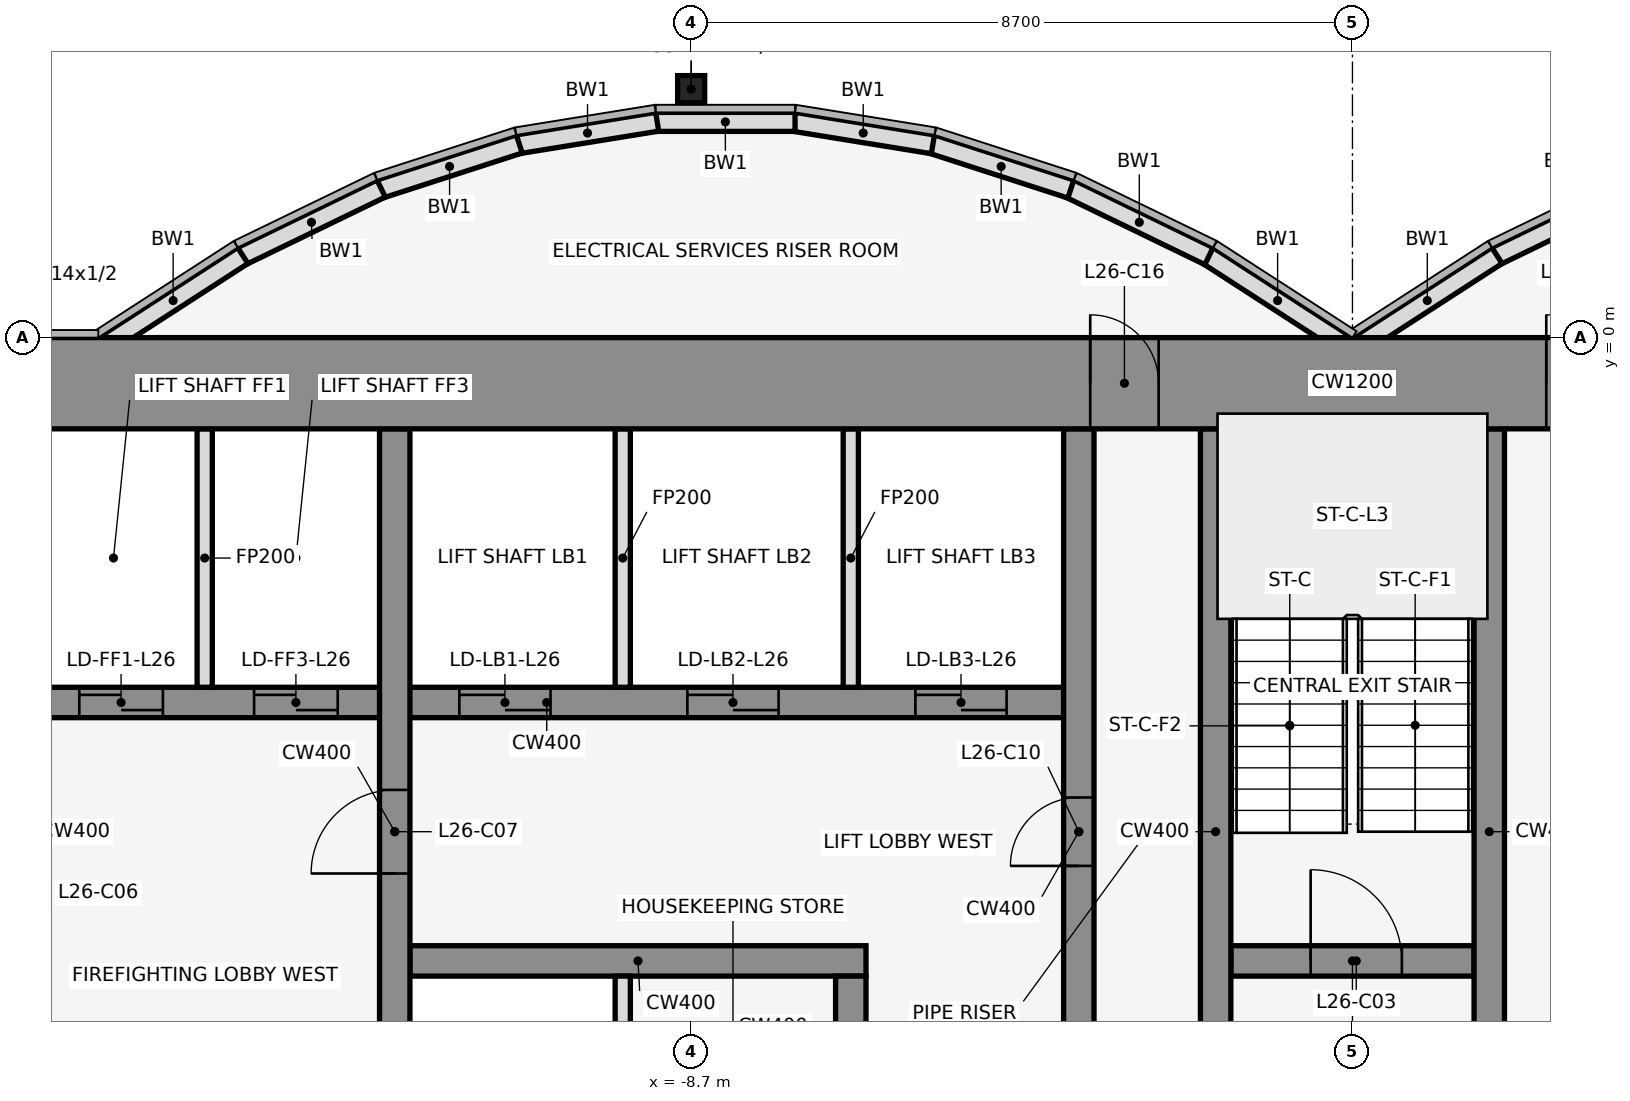
"""IFC4 building model, lengths in metres.
Left out: names, types, materials, properties, quantities, classifications, styles, units other than length and angle.
Written with IfcOpenShell. Run it as: python <this file> out.ifc"""

import sys

from ifc_helpers import new_model, si_unit, direction, frame, frame_2d, origin, origin_2d, place, context, subcontext, project, spatial, rectangle, hollow_rectangle, extrude, element, fill, save


model = new_model("IFC4")
c1 = context("Model", 3, precision=1e-05, world=origin(), true_north=direction((0.0, 1.0)))
c2 = subcontext(c1, "Body", "Model", "MODEL_VIEW")
j1 = project(units=[si_unit("LENGTHUNIT", "METRE"), si_unit("PLANEANGLEUNIT", "RADIAN")], contexts=[c1])
p1 = place(None, origin())
s1 = spatial("IfcSite", under=j1, at=p1, CompositionType="ELEMENT")
p2 = place(p1, origin())
s2 = spatial("IfcBuilding", under=s1, at=p2, CompositionType="ELEMENT")
p3 = place(p2, frame((0.0, 0.0, 122.7)))
s3 = spatial("IfcBuildingStorey", under=s2, at=p3, CompositionType="ELEMENT", Elevation=122.7)
p4 = place(p3, frame((-8.7, 3.269, 0.0), z_axis=(0.0, 0.0, 1.0), x_axis=(1.0, 0.0, 0.0)))
e1 = element("IfcColumn", 1, at=p4, inside=s3, PredefinedType="COLUMN", context=c2, shape_type="SweptSolid", body=[
    extrude(hollow_rectangle(XDim=0.356, YDim=0.356, WallThickness=0.012, at=origin_2d()), origin(), (0.0, 0.0, 1.0), 4.1),
])
p5 = place(p3, frame((3.721, 1.962, 0.0), z_axis=(0.0, 0.0, 1.0), x_axis=(-0.89982408427, -0.436252928206, 0.0)))
e2 = element("IfcWall", 2, at=p5, inside=s3, PredefinedType="STANDARD", context=c2, shape_type="SweptSolid", body=[
    extrude(rectangle(XDim=2.038, YDim=0.25, at=frame_2d((1.019, 0.0))), origin(), (0.0, 0.0, 1.0), 3.95),
])
for number, where, z_axis, x_axis in (
    (3, (1.901, 1.08, 0.0), (0.0, 0.0, 1.0), (-0.84, -0.543, 0.0)),
    (4, (-0.068, -0.105, 0.0), (0.0, 0.0, 1.0), (-0.84, 0.543, 0.0)),
):
    element("IfcWall", number, at=place(p3, frame(where, z_axis=z_axis, x_axis=x_axis)), inside=s3, PredefinedType="STANDARD", context=c2, shape_type="SweptSolid", body=[
        extrude(rectangle(XDim=2.183, YDim=0.25, at=frame_2d((1.091, 0.0))), origin(), (0.0, 0.0, 1.0), 3.95),
    ])
p6 = place(p3, frame((-1.888, 1.073, 0.0), z_axis=(0.0, 0.0, 1.0), x_axis=(-0.89982408427, 0.436252928206, 0.0)))
e5 = element("IfcWall", 5, at=p6, inside=s3, PredefinedType="STANDARD", context=c2, shape_type="SweptSolid", body=[
    extrude(rectangle(XDim=2.038, YDim=0.25, at=frame_2d((1.019, 0.0))), origin(), (0.0, 0.0, 1.0), 3.95),
])
p7 = place(p3, frame((-3.705, 1.955, 0.0), z_axis=(0.0, 0.0, 1.0), x_axis=(-0.951495806175, 0.307661714928, 0.0)))
e6 = element("IfcWall", 6, at=p7, inside=s3, PredefinedType="STANDARD", context=c2, shape_type="SweptSolid", body=[
    extrude(rectangle(XDim=1.927, YDim=0.25, at=frame_2d((0.963, 0.0))), origin(), (0.0, 0.0, 1.0), 3.95),
])
p8 = place(p3, frame((-5.52, 2.543, 0.0), z_axis=(0.0, 0.0, 1.0), x_axis=(-0.987181718931, 0.159600293885, 0.0)))
e7 = element("IfcWall", 7, at=p8, inside=s3, PredefinedType="STANDARD", context=c2, shape_type="SweptSolid", body=[
    extrude(rectangle(XDim=1.857, YDim=0.25, at=frame_2d((0.929, 0.0))), origin(), (0.0, 0.0, 1.0), 3.95),
])
p9 = place(p3, frame((-7.333, 2.838, 0.0), z_axis=(0.0, 0.0, 1.0), x_axis=(-1.0, 0.0, 0.0)))
e8 = element("IfcWall", 8, at=p9, inside=s3, PredefinedType="STANDARD", context=c2, shape_type="SweptSolid", body=[
    extrude(rectangle(XDim=1.833, YDim=0.25, at=frame_2d((0.917, 0.0))), origin(), (0.0, 0.0, 1.0), 3.95),
])
p10 = place(p3, frame((-9.147, 2.84, 0.0), z_axis=(0.0, 0.0, 1.0), x_axis=(-0.987181718931, -0.159600293885, 0.0)))
e9 = element("IfcWall", 9, at=p10, inside=s3, PredefinedType="STANDARD", context=c2, shape_type="SweptSolid", body=[
    extrude(rectangle(XDim=1.857, YDim=0.25, at=frame_2d((0.929, 0.0))), origin(), (0.0, 0.0, 1.0), 3.95),
])
p11 = place(p3, frame((-10.962, 2.548, 0.0), z_axis=(0.0, 0.0, 1.0), x_axis=(-0.951495806175, -0.307661714928, 0.0)))
e10 = element("IfcWall", 10, at=p11, inside=s3, PredefinedType="STANDARD", context=c2, shape_type="SweptSolid", body=[
    extrude(rectangle(XDim=1.927, YDim=0.25, at=frame_2d((0.963, 0.0))), origin(), (0.0, 0.0, 1.0), 3.95),
])
p12 = place(p3, frame((-12.779, 1.962, 0.0), z_axis=(0.0, 0.0, 1.0), x_axis=(-0.89982408427, -0.436252928206, 0.0)))
e11 = element("IfcWall", 11, at=p12, inside=s3, PredefinedType="STANDARD", context=c2, shape_type="SweptSolid", body=[
    extrude(rectangle(XDim=2.038, YDim=0.25, at=frame_2d((1.019, 0.0))), origin(), (0.0, 0.0, 1.0), 3.95),
])
p13 = place(p3, frame((-14.599, 1.08, 0.0), z_axis=(0.0, 0.0, 1.0), x_axis=(-0.83981312244, -0.542875602121, 0.0)))
e12 = element("IfcWall", 12, at=p13, inside=s3, PredefinedType="STANDARD", context=c2, shape_type="SweptSolid", body=[
    extrude(rectangle(XDim=2.183, YDim=0.25, at=frame_2d((1.091, 0.0))), origin(), (0.0, 0.0, 1.0), 3.95),
])
p14 = place(p3, frame((-12.4, -8.2, 0.0), z_axis=(0.0, 0.0, 1.0), x_axis=(1.0, 0.0, 0.0)))
e13 = element("IfcWall", 13, at=p14, inside=s3, PredefinedType="SHEAR", context=c2, shape_type="SweptSolid", body=[
    extrude(rectangle(XDim=6.0, YDim=0.4, at=frame_2d((3.0, 0.0))), origin(), (0.0, 0.0, 1.0), 4.1),
])
p15 = place(p3, frame((-1.6, -8.2, 0.0), z_axis=(0.0, 0.0, 1.0), x_axis=(1.0, 0.0, 0.0)))
e14 = element("IfcWall", 14, at=p15, inside=s3, PredefinedType="SHEAR", context=c2, shape_type="SweptSolid", body=[
    extrude(rectangle(XDim=3.2, YDim=0.4, at=frame_2d((1.6, 0.0))), origin(), (0.0, 0.0, 1.0), 4.1),
])
p16 = place(p15, frame((1.05, 0.0, 0.0)))
e15 = element("IfcOpeningElement", 15, at=p16, cuts=e14, PredefinedType="OPENING", context=c2, shape_type="SweptSolid", body=[
    extrude(rectangle(XDim=1.2, YDim=2.1, at=frame_2d((0.6, 1.05))), frame((0.0, 0.212, 0.0), z_axis=(0.0, -1.0, 0.0), x_axis=(1.0, 0.0, 0.0)), (0.0, 0.0, 1.0), 0.424),
])
p17 = place(p3, frame((-17.4, -4.8, 0.0), z_axis=(0.0, 0.0, 1.0), x_axis=(1.0, 0.0, 0.0)))
e16 = element("IfcWall", 16, at=p17, inside=s3, PredefinedType="SHEAR", context=c2, shape_type="SweptSolid", body=[
    extrude(rectangle(XDim=13.6, YDim=0.4, at=frame_2d((6.8, 0.0))), origin(), (0.0, 0.0, 1.0), 4.1),
])
p18 = place(p17, frame((0.65, 0.0, 0.0)))
e17 = element("IfcOpeningElement", 17, at=p18, cuts=e16, PredefinedType="OPENING", context=c2, shape_type="SweptSolid", body=[
    extrude(rectangle(XDim=1.1, YDim=2.1, at=frame_2d((0.55, 1.05))), frame((0.0, 0.212, 0.0), z_axis=(0.0, -1.0, 0.0), x_axis=(1.0, 0.0, 0.0)), (0.0, 0.0, 1.0), 0.424),
])
p19 = place(p17, frame((2.95, 0.0, 0.0)))
e18 = element("IfcOpeningElement", 18, at=p19, cuts=e16, PredefinedType="OPENING", context=c2, shape_type="SweptSolid", body=[
    extrude(rectangle(XDim=1.1, YDim=2.1, at=frame_2d((0.55, 1.05))), frame((0.0, 0.212, 0.0), z_axis=(0.0, -1.0, 0.0), x_axis=(1.0, 0.0, 0.0)), (0.0, 0.0, 1.0), 0.424),
])
p20 = place(p17, frame((5.65, 0.0, 0.0)))
e19 = element("IfcOpeningElement", 19, at=p20, cuts=e16, PredefinedType="OPENING", context=c2, shape_type="SweptSolid", body=[
    extrude(rectangle(XDim=1.2, YDim=2.1, at=frame_2d((0.6, 1.05))), frame((0.0, 0.212, 0.0), z_axis=(0.0, -1.0, 0.0), x_axis=(1.0, 0.0, 0.0)), (0.0, 0.0, 1.0), 0.424),
])
p21 = place(p17, frame((8.65, 0.0, 0.0)))
e20 = element("IfcOpeningElement", 20, at=p21, cuts=e16, PredefinedType="OPENING", context=c2, shape_type="SweptSolid", body=[
    extrude(rectangle(XDim=1.2, YDim=2.1, at=frame_2d((0.6, 1.05))), frame((0.0, 0.212, 0.0), z_axis=(0.0, -1.0, 0.0), x_axis=(1.0, 0.0, 0.0)), (0.0, 0.0, 1.0), 0.424),
])
p22 = place(p17, frame((11.65, 0.0, 0.0)))
e21 = element("IfcOpeningElement", 21, at=p22, cuts=e16, PredefinedType="OPENING", context=c2, shape_type="SweptSolid", body=[
    extrude(rectangle(XDim=1.2, YDim=2.1, at=frame_2d((0.6, 1.05))), frame((0.0, 0.212, 0.0), z_axis=(0.0, -1.0, 0.0), x_axis=(1.0, 0.0, 0.0)), (0.0, 0.0, 1.0), 0.424),
])
p23 = place(p3, frame((-15.1, -4.6, 0.0), z_axis=(0.0, 0.0, 1.0), x_axis=(0.0, 1.0, 0.0)))
e22 = element("IfcWall", 22, at=p23, inside=s3, PredefinedType="PARTITIONING", context=c2, shape_type="SweptSolid", body=[
    extrude(rectangle(XDim=3.4, YDim=0.2, at=frame_2d((1.7, 0.0))), origin(), (0.0, 0.0, 1.0), 3.018),
])
p24 = place(p3, frame((-12.6, -11.8, 0.0), z_axis=(0.0, 0.0, 1.0), x_axis=(0.0, 1.0, 0.0)))
e23 = element("IfcWall", 23, at=p24, inside=s3, PredefinedType="SHEAR", context=c2, shape_type="SweptSolid", body=[
    extrude(rectangle(XDim=10.6, YDim=0.4, at=frame_2d((5.3, 0.0))), origin(), (0.0, 0.0, 1.0), 4.1),
])
p25 = place(p24, frame((4.75, 0.0, 0.0)))
e24 = element("IfcOpeningElement", 24, at=p25, cuts=e23, PredefinedType="OPENING", context=c2, shape_type="SweptSolid", body=[
    extrude(rectangle(XDim=1.1, YDim=2.1, at=frame_2d((0.55, 1.05))), frame((0.0, 0.212, 0.0), z_axis=(0.0, -1.0, 0.0), x_axis=(1.0, 0.0, 0.0)), (0.0, 0.0, 1.0), 0.424),
])
for number, where, z_axis, x_axis in (
    (25, (-9.6, -11.8, 0.0), (0.0, 0.0, 1.0), (0.0, 1.0, 0.0)),
    (26, (-9.6, -4.6, 0.0), (0.0, 0.0, 1.0), (0.0, 1.0, 0.0)),
):
    element("IfcWall", number, at=place(p3, frame(where, z_axis=z_axis, x_axis=x_axis)), inside=s3, PredefinedType="PARTITIONING", context=c2, shape_type="SweptSolid", body=[
        extrude(rectangle(XDim=3.4, YDim=0.2, at=frame_2d((1.7, 0.0))), origin(), (0.0, 0.0, 1.0), 3.018),
    ])
p26 = place(p3, frame((-6.6, -11.8, 0.0), z_axis=(0.0, 0.0, 1.0), x_axis=(0.0, 1.0, 0.0)))
e27 = element("IfcWall", 27, at=p26, inside=s3, PredefinedType="SHEAR", context=c2, shape_type="SweptSolid", body=[
    extrude(rectangle(XDim=3.4, YDim=0.4, at=frame_2d((1.7, 0.0))), origin(), (0.0, 0.0, 1.0), 4.1),
])
p27 = place(p26, frame((1.25, 0.0, 0.0)))
e28 = element("IfcOpeningElement", 28, at=p27, cuts=e27, PredefinedType="OPENING", context=c2, shape_type="SweptSolid", body=[
    extrude(rectangle(XDim=0.9, YDim=2.1, at=frame_2d((0.45, 1.05))), frame((0.0, 0.212, 0.0), z_axis=(0.0, -1.0, 0.0), x_axis=(1.0, 0.0, 0.0)), (0.0, 0.0, 1.0), 0.424),
])
p28 = place(p3, frame((-6.6, -4.6, 0.0), z_axis=(0.0, 0.0, 1.0), x_axis=(0.0, 1.0, 0.0)))
e29 = element("IfcWall", 29, at=p28, inside=s3, PredefinedType="PARTITIONING", context=c2, shape_type="SweptSolid", body=[
    extrude(rectangle(XDim=3.4, YDim=0.2, at=frame_2d((1.7, 0.0))), origin(), (0.0, 0.0, 1.0), 3.018),
])
p29 = place(p3, frame((-3.6, -11.8, 0.0), z_axis=(0.0, 0.0, 1.0), x_axis=(0.0, 1.0, 0.0)))
e30 = element("IfcWall", 30, at=p29, inside=s3, PredefinedType="SHEAR", context=c2, shape_type="SweptSolid", body=[
    extrude(rectangle(XDim=10.6, YDim=0.4, at=frame_2d((5.3, 0.0))), origin(), (0.0, 0.0, 1.0), 4.1),
])
p30 = place(p29, frame((4.85, 0.0, 0.0)))
e31 = element("IfcOpeningElement", 31, at=p30, cuts=e30, PredefinedType="OPENING", context=c2, shape_type="SweptSolid", body=[
    extrude(rectangle(XDim=0.9, YDim=2.1, at=frame_2d((0.45, 1.05))), frame((0.0, 0.212, 0.0), z_axis=(0.0, -1.0, 0.0), x_axis=(1.0, 0.0, 0.0)), (0.0, 0.0, 1.0), 0.424),
])
for number, where, z_axis, x_axis in (
    (32, (-1.8, -11.8, 0.0), (0.0, 0.0, 1.0), (0.0, 1.0, 0.0)),
    (33, (1.8, -11.8, 0.0), (0.0, 0.0, 1.0), (0.0, 1.0, 0.0)),
):
    element("IfcWall", number, at=place(p3, frame(where, z_axis=z_axis, x_axis=x_axis)), inside=s3, PredefinedType="SHEAR", context=c2, shape_type="SweptSolid", body=[
        extrude(rectangle(XDim=10.6, YDim=0.4, at=frame_2d((5.3, 0.0))), origin(), (0.0, 0.0, 1.0), 4.1),
    ])
p31 = place(p3, frame((-22.0, -0.6, 0.0), z_axis=(0.0, 0.0, 1.0), x_axis=(1.0, 0.0, 0.0)))
e34 = element("IfcWall", 34, at=p31, inside=s3, PredefinedType="SHEAR", context=c2, shape_type="SweptSolid", body=[
    extrude(rectangle(XDim=44.0, YDim=1.2, at=frame_2d((22.0, 0.0))), origin(), (0.0, 0.0, 1.0), 4.1),
])
p32 = place(p31, frame((18.55, 0.0, 0.0)))
e35 = element("IfcOpeningElement", 35, at=p32, cuts=e34, PredefinedType="OPENING", context=c2, shape_type="SweptSolid", body=[
    extrude(rectangle(XDim=0.9, YDim=2.1, at=frame_2d((0.45, 1.05))), frame((0.0, 0.612, 0.0), z_axis=(0.0, -1.0, 0.0), x_axis=(1.0, 0.0, 0.0)), (0.0, 0.0, 1.0), 1.224),
])
p33 = place(p31, frame((24.55, 0.0, 0.0)))
e36 = element("IfcOpeningElement", 36, at=p33, cuts=e34, PredefinedType="OPENING", context=c2, shape_type="SweptSolid", body=[
    extrude(rectangle(XDim=0.9, YDim=2.1, at=frame_2d((0.45, 1.05))), frame((0.0, 0.612, 0.0), z_axis=(0.0, -1.0, 0.0), x_axis=(1.0, 0.0, 0.0)), (0.0, 0.0, 1.0), 1.224),
])
p34 = place(p16, origin())
e37 = element("IfcDoor", 37, at=p34, inside=s3, OperationType="SINGLE_SWING_LEFT", PredefinedType="DOOR", context=c2, shape_type="SweptSolid", body=[
    extrude(rectangle(XDim=1.2, YDim=2.1, at=frame_2d((0.6, 1.05))), frame((0.0, 0.025, 0.0), z_axis=(0.0, -1.0, 0.0), x_axis=(1.0, 0.0, 0.0)), (0.0, 0.0, 1.0), 0.05),
])
fill(e15, e37)
p35 = place(p18, origin())
e38 = element("IfcDoor", 38, at=p35, inside=s3, OperationType="DOUBLE_DOOR_SLIDING", PredefinedType="DOOR", context=c2, shape_type="SweptSolid", body=[
    extrude(rectangle(XDim=1.1, YDim=2.1, at=frame_2d((0.55, 1.05))), frame((0.0, 0.025, 0.0), z_axis=(0.0, -1.0, 0.0), x_axis=(1.0, 0.0, 0.0)), (0.0, 0.0, 1.0), 0.05),
])
fill(e17, e38)
p36 = place(p19, origin())
e39 = element("IfcDoor", 39, at=p36, inside=s3, OperationType="DOUBLE_DOOR_SLIDING", PredefinedType="DOOR", context=c2, shape_type="SweptSolid", body=[
    extrude(rectangle(XDim=1.1, YDim=2.1, at=frame_2d((0.55, 1.05))), frame((0.0, 0.025, 0.0), z_axis=(0.0, -1.0, 0.0), x_axis=(1.0, 0.0, 0.0)), (0.0, 0.0, 1.0), 0.05),
])
fill(e18, e39)
p37 = place(p20, origin())
e40 = element("IfcDoor", 40, at=p37, inside=s3, OperationType="DOUBLE_DOOR_SLIDING", PredefinedType="DOOR", context=c2, shape_type="SweptSolid", body=[
    extrude(rectangle(XDim=1.2, YDim=2.1, at=frame_2d((0.6, 1.05))), frame((0.0, 0.025, 0.0), z_axis=(0.0, -1.0, 0.0), x_axis=(1.0, 0.0, 0.0)), (0.0, 0.0, 1.0), 0.05),
])
fill(e19, e40)
p38 = place(p21, origin())
e41 = element("IfcDoor", 41, at=p38, inside=s3, OperationType="DOUBLE_DOOR_SLIDING", PredefinedType="DOOR", context=c2, shape_type="SweptSolid", body=[
    extrude(rectangle(XDim=1.2, YDim=2.1, at=frame_2d((0.6, 1.05))), frame((0.0, 0.025, 0.0), z_axis=(0.0, -1.0, 0.0), x_axis=(1.0, 0.0, 0.0)), (0.0, 0.0, 1.0), 0.05),
])
fill(e20, e41)
p39 = place(p22, origin())
e42 = element("IfcDoor", 42, at=p39, inside=s3, OperationType="DOUBLE_DOOR_SLIDING", PredefinedType="DOOR", context=c2, shape_type="SweptSolid", body=[
    extrude(rectangle(XDim=1.2, YDim=2.1, at=frame_2d((0.6, 1.05))), frame((0.0, 0.025, 0.0), z_axis=(0.0, -1.0, 0.0), x_axis=(1.0, 0.0, 0.0)), (0.0, 0.0, 1.0), 0.05),
])
fill(e21, e42)
p40 = place(p25, origin())
e43 = element("IfcDoor", 43, at=p40, inside=s3, OperationType="SINGLE_SWING_LEFT", PredefinedType="DOOR", context=c2, shape_type="SweptSolid", body=[
    extrude(rectangle(XDim=1.1, YDim=2.1, at=frame_2d((0.55, 1.05))), frame((0.0, 0.025, 0.0), z_axis=(0.0, -1.0, 0.0), x_axis=(1.0, 0.0, 0.0)), (0.0, 0.0, 1.0), 0.05),
])
fill(e24, e43)
p41 = place(p30, frame((0.9, 0.0, 0.0), z_axis=(0.0, 0.0, 1.0), x_axis=(-1.0, 0.0, 0.0)))
e44 = element("IfcDoor", 44, at=p41, inside=s3, OperationType="SINGLE_SWING_LEFT", PredefinedType="DOOR", context=c2, shape_type="SweptSolid", body=[
    extrude(rectangle(XDim=0.9, YDim=2.1, at=frame_2d((0.45, 1.05))), frame((0.0, 0.025, 0.0), z_axis=(0.0, -1.0, 0.0), x_axis=(1.0, 0.0, 0.0)), (0.0, 0.0, 1.0), 0.05),
])
fill(e31, e44)
p42 = place(p32, origin())
e45 = element("IfcDoor", 45, at=p42, inside=s3, OperationType="SINGLE_SWING_LEFT", PredefinedType="DOOR", context=c2, shape_type="SweptSolid", body=[
    extrude(rectangle(XDim=0.9, YDim=2.1, at=frame_2d((0.45, 1.05))), frame((0.0, 0.025, 0.0), z_axis=(0.0, -1.0, 0.0), x_axis=(1.0, 0.0, 0.0)), (0.0, 0.0, 1.0), 0.05),
])
fill(e35, e45)
p43 = place(p33, origin())
e46 = element("IfcDoor", 46, at=p43, inside=s3, OperationType="SINGLE_SWING_LEFT", PredefinedType="DOOR", context=c2, shape_type="SweptSolid", body=[
    extrude(rectangle(XDim=0.9, YDim=2.1, at=frame_2d((0.45, 1.05))), frame((0.0, 0.025, 0.0), z_axis=(0.0, -1.0, 0.0), x_axis=(1.0, 0.0, 0.0)), (0.0, 0.0, 1.0), 0.05),
])
fill(e36, e46)
save(model, sys.argv[1])
